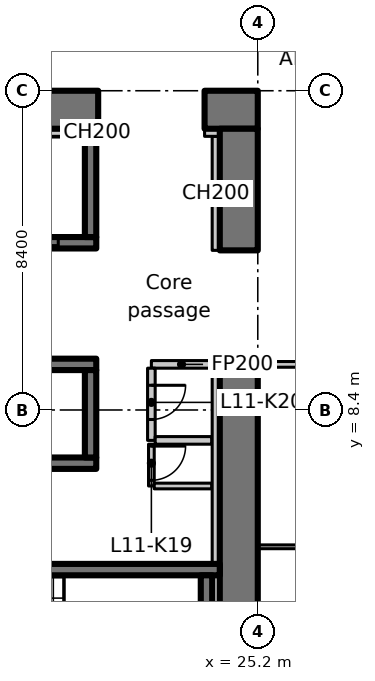
"""IFC4 building model, lengths in metres.
Left out: names, types, materials, properties, quantities, classifications, styles, units other than length and angle.
Written with IfcOpenShell. Run it as: python <this file> out.ifc"""

import sys

from ifc_helpers import new_model, si_unit, direction, frame, frame_2d, origin, place, context, subcontext, project, spatial, rectangle, extrude, element, fill, save


model = new_model("IFC4")
c1 = context("Model", 3, precision=1e-05, world=origin(), true_north=direction((0.0, 1.0)))
c2 = subcontext(c1, "Body", "Model", "MODEL_VIEW")
j1 = project(units=[si_unit("LENGTHUNIT", "METRE"), si_unit("PLANEANGLEUNIT", "RADIAN")], contexts=[c1])
p1 = place(None, origin())
s1 = spatial("IfcSite", under=j1, at=p1, CompositionType="ELEMENT")
p2 = place(p1, origin())
s2 = spatial("IfcBuilding", under=s1, at=p2, CompositionType="ELEMENT")
p3 = place(p2, frame((0.0, 0.0, 54.5)))
s3 = spatial("IfcBuildingStorey", under=s2, at=p3, CompositionType="ELEMENT", Elevation=54.5)
p4 = place(p3, frame((-1.1, 16.3, 0.0), z_axis=(0.0, 0.0, 1.0), x_axis=(1.0, 0.0, 0.0)))
e1 = element("IfcWall", 1, at=p4, inside=s3, PredefinedType="SHEAR", context=c2, shape_type="SweptSolid", body=[
    extrude(rectangle(XDim=22.1, YDim=1.0, at=frame_2d((11.05, 0.0))), origin(), (0.0, 0.0, 1.0), 3.35),
])
p5 = place(p4, frame((3.15, 0.0, 0.0)))
e2 = element("IfcOpeningElement", 2, at=p5, cuts=e1, PredefinedType="OPENING", context=c2, shape_type="SweptSolid", body=[
    extrude(rectangle(XDim=1.1, YDim=2.3, at=frame_2d((0.55, 1.15))), frame((0.0, 0.51, 0.0), z_axis=(0.0, -1.0, 0.0), x_axis=(1.0, 0.0, 0.0)), (0.0, 0.0, 1.0), 1.02),
])
p6 = place(p3, frame((23.8, 16.3, 0.0), z_axis=(0.0, 0.0, 1.0), x_axis=(1.0, 0.0, 0.0)))
e3 = element("IfcWall", 3, at=p6, inside=s3, PredefinedType="SHEAR", context=c2, shape_type="SweptSolid", body=[
    extrude(rectangle(XDim=1.4, YDim=1.0, at=frame_2d((0.7, 0.0))), origin(), (0.0, 0.0, 1.0), 3.35),
])
p7 = place(p3, frame((24.7, 1.0, 0.0), z_axis=(0.0, 0.0, 1.0), x_axis=(0.0, 1.0, 0.0)))
e4 = element("IfcWall", 4, at=p7, inside=s3, PredefinedType="SHEAR", context=c2, shape_type="SweptSolid", body=[
    extrude(rectangle(XDim=8.8, YDim=1.0, at=frame_2d((4.4, 0.0))), origin(), (0.0, 0.0, 1.0), 3.35),
])
p8 = place(p3, frame((24.7, 12.6, 0.0), z_axis=(0.0, 0.0, 1.0), x_axis=(0.0, 1.0, 0.0)))
e5 = element("IfcWall", 5, at=p8, inside=s3, PredefinedType="SHEAR", context=c2, shape_type="SweptSolid", body=[
    extrude(rectangle(XDim=3.2, YDim=1.0, at=frame_2d((1.6, 0.0))), origin(), (0.0, 0.0, 1.0), 3.35),
])
p9 = place(p3, frame((24.1, 12.6, 0.0), z_axis=(0.0, 0.0, 1.0), x_axis=(0.0, 1.0, 0.0)))
e6 = element("IfcWall", 6, at=p9, inside=s3, PredefinedType="PARTITIONING", context=c2, shape_type="SweptSolid", body=[
    extrude(rectangle(XDim=3.0, YDim=0.2, at=frame_2d((1.5, 0.0))), origin(), (0.0, 0.0, 1.0), 3.35),
])
p10 = place(p3, frame((23.8, 15.7, 0.0), z_axis=(0.0, 0.0, 1.0), x_axis=(1.0, 0.0, 0.0)))
e7 = element("IfcWall", 7, at=p10, inside=s3, PredefinedType="PARTITIONING", context=c2, shape_type="SweptSolid", body=[
    extrude(rectangle(XDim=0.4, YDim=0.2, at=frame_2d((0.2, 0.0))), origin(), (0.0, 0.0, 1.0), 3.35),
])
p11 = place(p3, frame((1.0, 7.0, 0.0), z_axis=(0.0, 0.0, 1.0), x_axis=(1.0, 0.0, 0.0)))
e8 = element("IfcWall", 8, at=p11, inside=s3, PredefinedType="SHEAR", context=c2, shape_type="SweptSolid", body=[
    extrude(rectangle(XDim=19.95, YDim=0.3, at=frame_2d((9.975, 0.0))), origin(), (0.0, 0.0, 1.0), 3.35),
])
p12 = place(p3, frame((1.0, 9.6, 0.0), z_axis=(0.0, 0.0, 1.0), x_axis=(1.0, 0.0, 0.0)))
e9 = element("IfcWall", 9, at=p12, inside=s3, PredefinedType="SHEAR", context=c2, shape_type="SweptSolid", body=[
    extrude(rectangle(XDim=19.95, YDim=0.3, at=frame_2d((9.975, 0.0))), origin(), (0.0, 0.0, 1.0), 3.35),
])
p13 = place(p12, frame((1.05, 0.0, 0.0)))
e10 = element("IfcOpeningElement", 10, at=p13, cuts=e9, PredefinedType="OPENING", context=c2, shape_type="SweptSolid", body=[
    extrude(rectangle(XDim=1.1, YDim=2.3, at=frame_2d((0.55, 1.15))), frame((0.0, 0.16, 0.0), z_axis=(0.0, -1.0, 0.0), x_axis=(1.0, 0.0, 0.0)), (0.0, 0.0, 1.0), 0.32),
])
p14 = place(p12, frame((3.85, 0.0, 0.0)))
e11 = element("IfcOpeningElement", 11, at=p14, cuts=e9, PredefinedType="OPENING", context=c2, shape_type="SweptSolid", body=[
    extrude(rectangle(XDim=1.1, YDim=2.3, at=frame_2d((0.55, 1.15))), frame((0.0, 0.16, 0.0), z_axis=(0.0, -1.0, 0.0), x_axis=(1.0, 0.0, 0.0)), (0.0, 0.0, 1.0), 0.32),
])
p15 = place(p12, frame((6.65, 0.0, 0.0)))
e12 = element("IfcOpeningElement", 12, at=p15, cuts=e9, PredefinedType="OPENING", context=c2, shape_type="SweptSolid", body=[
    extrude(rectangle(XDim=1.1, YDim=2.3, at=frame_2d((0.55, 1.15))), frame((0.0, 0.16, 0.0), z_axis=(0.0, -1.0, 0.0), x_axis=(1.0, 0.0, 0.0)), (0.0, 0.0, 1.0), 0.32),
])
p16 = place(p12, frame((9.45, 0.0, 0.0)))
e13 = element("IfcOpeningElement", 13, at=p16, cuts=e9, PredefinedType="OPENING", context=c2, shape_type="SweptSolid", body=[
    extrude(rectangle(XDim=1.1, YDim=2.3, at=frame_2d((0.55, 1.15))), frame((0.0, 0.16, 0.0), z_axis=(0.0, -1.0, 0.0), x_axis=(1.0, 0.0, 0.0)), (0.0, 0.0, 1.0), 0.32),
])
p17 = place(p12, frame((12.25, 0.0, 0.0)))
e14 = element("IfcOpeningElement", 14, at=p17, cuts=e9, PredefinedType="OPENING", context=c2, shape_type="SweptSolid", body=[
    extrude(rectangle(XDim=1.1, YDim=2.3, at=frame_2d((0.55, 1.15))), frame((0.0, 0.16, 0.0), z_axis=(0.0, -1.0, 0.0), x_axis=(1.0, 0.0, 0.0)), (0.0, 0.0, 1.0), 0.32),
])
p18 = place(p12, frame((15.05, 0.0, 0.0)))
e15 = element("IfcOpeningElement", 15, at=p18, cuts=e9, PredefinedType="OPENING", context=c2, shape_type="SweptSolid", body=[
    extrude(rectangle(XDim=1.1, YDim=2.3, at=frame_2d((0.55, 1.15))), frame((0.0, 0.16, 0.0), z_axis=(0.0, -1.0, 0.0), x_axis=(1.0, 0.0, 0.0)), (0.0, 0.0, 1.0), 0.32),
])
p19 = place(p3, frame((20.8, 7.15, 0.0), z_axis=(0.0, 0.0, 1.0), x_axis=(0.0, 1.0, 0.0)))
e16 = element("IfcWall", 16, at=p19, inside=s3, PredefinedType="SHEAR", context=c2, shape_type="SweptSolid", body=[
    extrude(rectangle(XDim=2.3, YDim=0.3, at=frame_2d((1.15, 0.0))), origin(), (0.0, 0.0, 1.0), 3.35),
])
p20 = place(p3, frame((15.05, 12.8, 0.0), z_axis=(0.0, 0.0, 1.0), x_axis=(1.0, 0.0, 0.0)))
e17 = element("IfcWall", 17, at=p20, inside=s3, PredefinedType="SHEAR", context=c2, shape_type="SweptSolid", body=[
    extrude(rectangle(XDim=5.9, YDim=0.3, at=frame_2d((2.95, 0.0))), origin(), (0.0, 0.0, 1.0), 3.35),
])
p21 = place(p20, frame((3.8, 0.0, 0.0)))
e18 = element("IfcOpeningElement", 18, at=p21, cuts=e17, PredefinedType="OPENING", context=c2, shape_type="SweptSolid", body=[
    extrude(rectangle(XDim=1.1, YDim=2.3, at=frame_2d((0.55, 1.15))), frame((0.0, 0.16, 0.0), z_axis=(0.0, -1.0, 0.0), x_axis=(1.0, 0.0, 0.0)), (0.0, 0.0, 1.0), 0.32),
])
p22 = place(p3, frame((20.8, 12.95, 0.0), z_axis=(0.0, 0.0, 1.0), x_axis=(0.0, 1.0, 0.0)))
e19 = element("IfcWall", 19, at=p22, inside=s3, PredefinedType="SHEAR", context=c2, shape_type="SweptSolid", body=[
    extrude(rectangle(XDim=2.85, YDim=0.3, at=frame_2d((1.425, 0.0))), origin(), (0.0, 0.0, 1.0), 3.35),
])
p23 = place(p3, frame((15.8, 4.2, 0.0), z_axis=(0.0, 0.0, 1.0), x_axis=(1.0, 0.0, 0.0)))
e20 = element("IfcWall", 20, at=p23, inside=s3, PredefinedType="SHEAR", context=c2, shape_type="SweptSolid", body=[
    extrude(rectangle(XDim=8.4, YDim=0.3, at=frame_2d((4.2, 0.0))), origin(), (0.0, 0.0, 1.0), 3.35),
])
p24 = place(p23, frame((0.4, 0.0, 0.0)))
e21 = element("IfcOpeningElement", 21, at=p24, cuts=e20, PredefinedType="OPENING", context=c2, shape_type="SweptSolid", body=[
    extrude(rectangle(XDim=1.0, YDim=2.1, at=frame_2d((0.5, 1.05))), frame((0.0, 0.16, 0.0), z_axis=(0.0, -1.0, 0.0), x_axis=(1.0, 0.0, 0.0)), (0.0, 0.0, 1.0), 0.32),
])
p25 = place(p3, frame((23.85, 1.5, 0.0), z_axis=(0.0, 0.0, 1.0), x_axis=(0.0, 1.0, 0.0)))
e22 = element("IfcWall", 22, at=p25, inside=s3, PredefinedType="SHEAR", context=c2, shape_type="SweptSolid", body=[
    extrude(rectangle(XDim=2.55, YDim=0.3, at=frame_2d((1.275, 0.0))), origin(), (0.0, 0.0, 1.0), 3.35),
])
p26 = place(p3, frame((23.988, 9.6, 0.0), z_axis=(0.0, 0.0, 1.0), x_axis=(-1.0, 0.0, 0.0)))
e23 = element("IfcWall", 23, at=p26, inside=s3, PredefinedType="PARTITIONING", context=c2, shape_type="SweptSolid", body=[
    extrude(rectangle(XDim=1.588, YDim=0.2, at=frame_2d((0.794, 0.0))), origin(), (0.0, 0.0, 1.0), 3.35),
])
p27 = place(p3, frame((22.4, 9.5, 0.0), z_axis=(0.0, 0.0, 1.0), x_axis=(0.0, -1.0, 0.0)))
e24 = element("IfcWall", 24, at=p27, inside=s3, PredefinedType="PARTITIONING", context=c2, shape_type="SweptSolid", body=[
    extrude(rectangle(XDim=1.9, YDim=0.2, at=frame_2d((0.95, 0.0))), origin(), (0.0, 0.0, 1.0), 3.35),
])
p28 = place(p27, frame((0.45, 0.0, 0.0)))
e25 = element("IfcOpeningElement", 25, at=p28, cuts=e24, PredefinedType="OPENING", context=c2, shape_type="SweptSolid", body=[
    extrude(rectangle(XDim=0.9, YDim=2.1, at=frame_2d((0.45, 1.05))), frame((0.0, 0.11, 0.0), z_axis=(0.0, -1.0, 0.0), x_axis=(1.0, 0.0, 0.0)), (0.0, 0.0, 1.0), 0.22),
])
p29 = place(p3, frame((22.5, 7.6, 0.0), z_axis=(0.0, 0.0, 1.0), x_axis=(1.0, 0.0, 0.0)))
e26 = element("IfcWall", 26, at=p29, inside=s3, PredefinedType="PARTITIONING", context=c2, shape_type="SweptSolid", body=[
    extrude(rectangle(XDim=1.488, YDim=0.2, at=frame_2d((0.744, 0.0))), origin(), (0.0, 0.0, 1.0), 3.35),
])
p30 = place(p3, frame((22.4, 7.5, 0.0), z_axis=(0.0, 0.0, 1.0), x_axis=(0.0, -1.0, 0.0)))
e27 = element("IfcWall", 27, at=p30, inside=s3, PredefinedType="PARTITIONING", context=c2, shape_type="SweptSolid", body=[
    extrude(rectangle(XDim=1.1, YDim=0.15, at=frame_2d((0.55, 0.0))), origin(), (0.0, 0.0, 1.0), 3.35),
])
p31 = place(p30, frame((0.05, 0.0, 0.0)))
e28 = element("IfcOpeningElement", 28, at=p31, cuts=e27, PredefinedType="OPENING", context=c2, shape_type="SweptSolid", body=[
    extrude(rectangle(XDim=0.9, YDim=2.1, at=frame_2d((0.45, 1.05))), frame((0.0, 0.085, 0.0), z_axis=(0.0, -1.0, 0.0), x_axis=(1.0, 0.0, 0.0)), (0.0, 0.0, 1.0), 0.17),
])
p32 = place(p3, frame((22.475, 6.4, 0.0), z_axis=(0.0, 0.0, 1.0), x_axis=(1.0, 0.0, 0.0)))
e29 = element("IfcWall", 29, at=p32, inside=s3, PredefinedType="PARTITIONING", context=c2, shape_type="SweptSolid", body=[
    extrude(rectangle(XDim=1.513, YDim=0.15, at=frame_2d((0.756, 0.0))), origin(), (0.0, 0.0, 1.0), 3.35),
])
p33 = place(p3, frame((18.15, 15.7, 0.0), z_axis=(0.0, 0.0, 1.0), x_axis=(1.0, 0.0, 0.0)))
e30 = element("IfcWall", 30, at=p33, inside=s3, PredefinedType="PARTITIONING", context=c2, shape_type="SweptSolid", body=[
    extrude(rectangle(XDim=2.5, YDim=0.2, at=frame_2d((1.25, 0.0))), origin(), (0.0, 0.0, 1.0), 3.35),
])
p34 = place(p3, frame((20.95, 15.7, 0.0), z_axis=(0.0, 0.0, 1.0), x_axis=(1.0, 0.0, 0.0)))
e31 = element("IfcWall", 31, at=p34, inside=s3, PredefinedType="PARTITIONING", context=c2, shape_type="SweptSolid", body=[
    extrude(rectangle(XDim=0.05, YDim=0.2, at=frame_2d((0.025, 0.0))), origin(), (0.0, 0.0, 1.0), 3.35),
])
p35 = place(p3, frame((24.1, 1.5, 0.0), z_axis=(0.0, 0.0, 1.0), x_axis=(0.0, 1.0, 0.0)))
e32 = element("IfcWall", 32, at=p35, inside=s3, PredefinedType="PARTITIONING", context=c2, shape_type="SweptSolid", body=[
    extrude(rectangle(XDim=2.55, YDim=0.2, at=frame_2d((1.275, 0.0))), origin(), (0.0, 0.0, 1.0), 3.35),
])
p36 = place(p3, frame((24.1, 4.35, 0.0), z_axis=(0.0, 0.0, 1.0), x_axis=(0.0, 1.0, 0.0)))
e33 = element("IfcWall", 33, at=p36, inside=s3, PredefinedType="PARTITIONING", context=c2, shape_type="SweptSolid", body=[
    extrude(rectangle(XDim=5.45, YDim=0.2, at=frame_2d((2.725, 0.0))), origin(), (0.0, 0.0, 1.0), 3.35),
])
p37 = place(p3, frame((29.4, 9.6, 0.0), z_axis=(0.0, 0.0, 1.0), x_axis=(-1.0, 0.0, 0.0)))
e34 = element("IfcWall", 34, at=p37, inside=s3, PredefinedType="PARTITIONING", context=c2, shape_type="SweptSolid", body=[
    extrude(rectangle(XDim=4.2, YDim=0.15, at=frame_2d((2.1, 0.0))), origin(), (0.0, 0.0, 1.0), 3.33),
])
p38 = place(p3, frame((25.2, 4.8, 0.0), z_axis=(0.0, 0.0, 1.0), x_axis=(1.0, 0.0, 0.0)))
e35 = element("IfcWall", 35, at=p38, inside=s3, PredefinedType="PARTITIONING", context=c2, shape_type="SweptSolid", body=[
    extrude(rectangle(XDim=4.2, YDim=0.1, at=frame_2d((2.1, 0.0))), origin(), (0.0, 0.0, 1.0), 3.33),
])
p39 = place(p21, origin())
e36 = element("IfcDoor", 36, at=p39, inside=s3, OperationType="SLIDING_TO_LEFT", PredefinedType="DOOR", context=c2, shape_type="SweptSolid", body=[
    extrude(rectangle(XDim=1.1, YDim=2.3, at=frame_2d((0.55, 1.15))), frame((0.0, 0.025, 0.0), z_axis=(0.0, -1.0, 0.0), x_axis=(1.0, 0.0, 0.0)), (0.0, 0.0, 1.0), 0.05),
])
fill(e18, e36)
p40 = place(p31, origin())
e37 = element("IfcDoor", 37, at=p40, inside=s3, OperationType="SINGLE_SWING_RIGHT", PredefinedType="DOOR", context=c2, shape_type="SweptSolid", body=[
    extrude(rectangle(XDim=0.9, YDim=2.1, at=frame_2d((0.45, 1.05))), frame((0.0, 0.025, 0.0), z_axis=(0.0, -1.0, 0.0), x_axis=(1.0, 0.0, 0.0)), (0.0, 0.0, 1.0), 0.05),
])
fill(e28, e37)
p41 = place(p28, origin())
e38 = element("IfcDoor", 38, at=p41, inside=s3, OperationType="SINGLE_SWING_LEFT", PredefinedType="DOOR", context=c2, shape_type="SweptSolid", body=[
    extrude(rectangle(XDim=0.9, YDim=2.1, at=frame_2d((0.45, 1.05))), frame((0.0, 0.025, 0.0), z_axis=(0.0, -1.0, 0.0), x_axis=(1.0, 0.0, 0.0)), (0.0, 0.0, 1.0), 0.05),
])
fill(e25, e38)
save(model, sys.argv[1])
